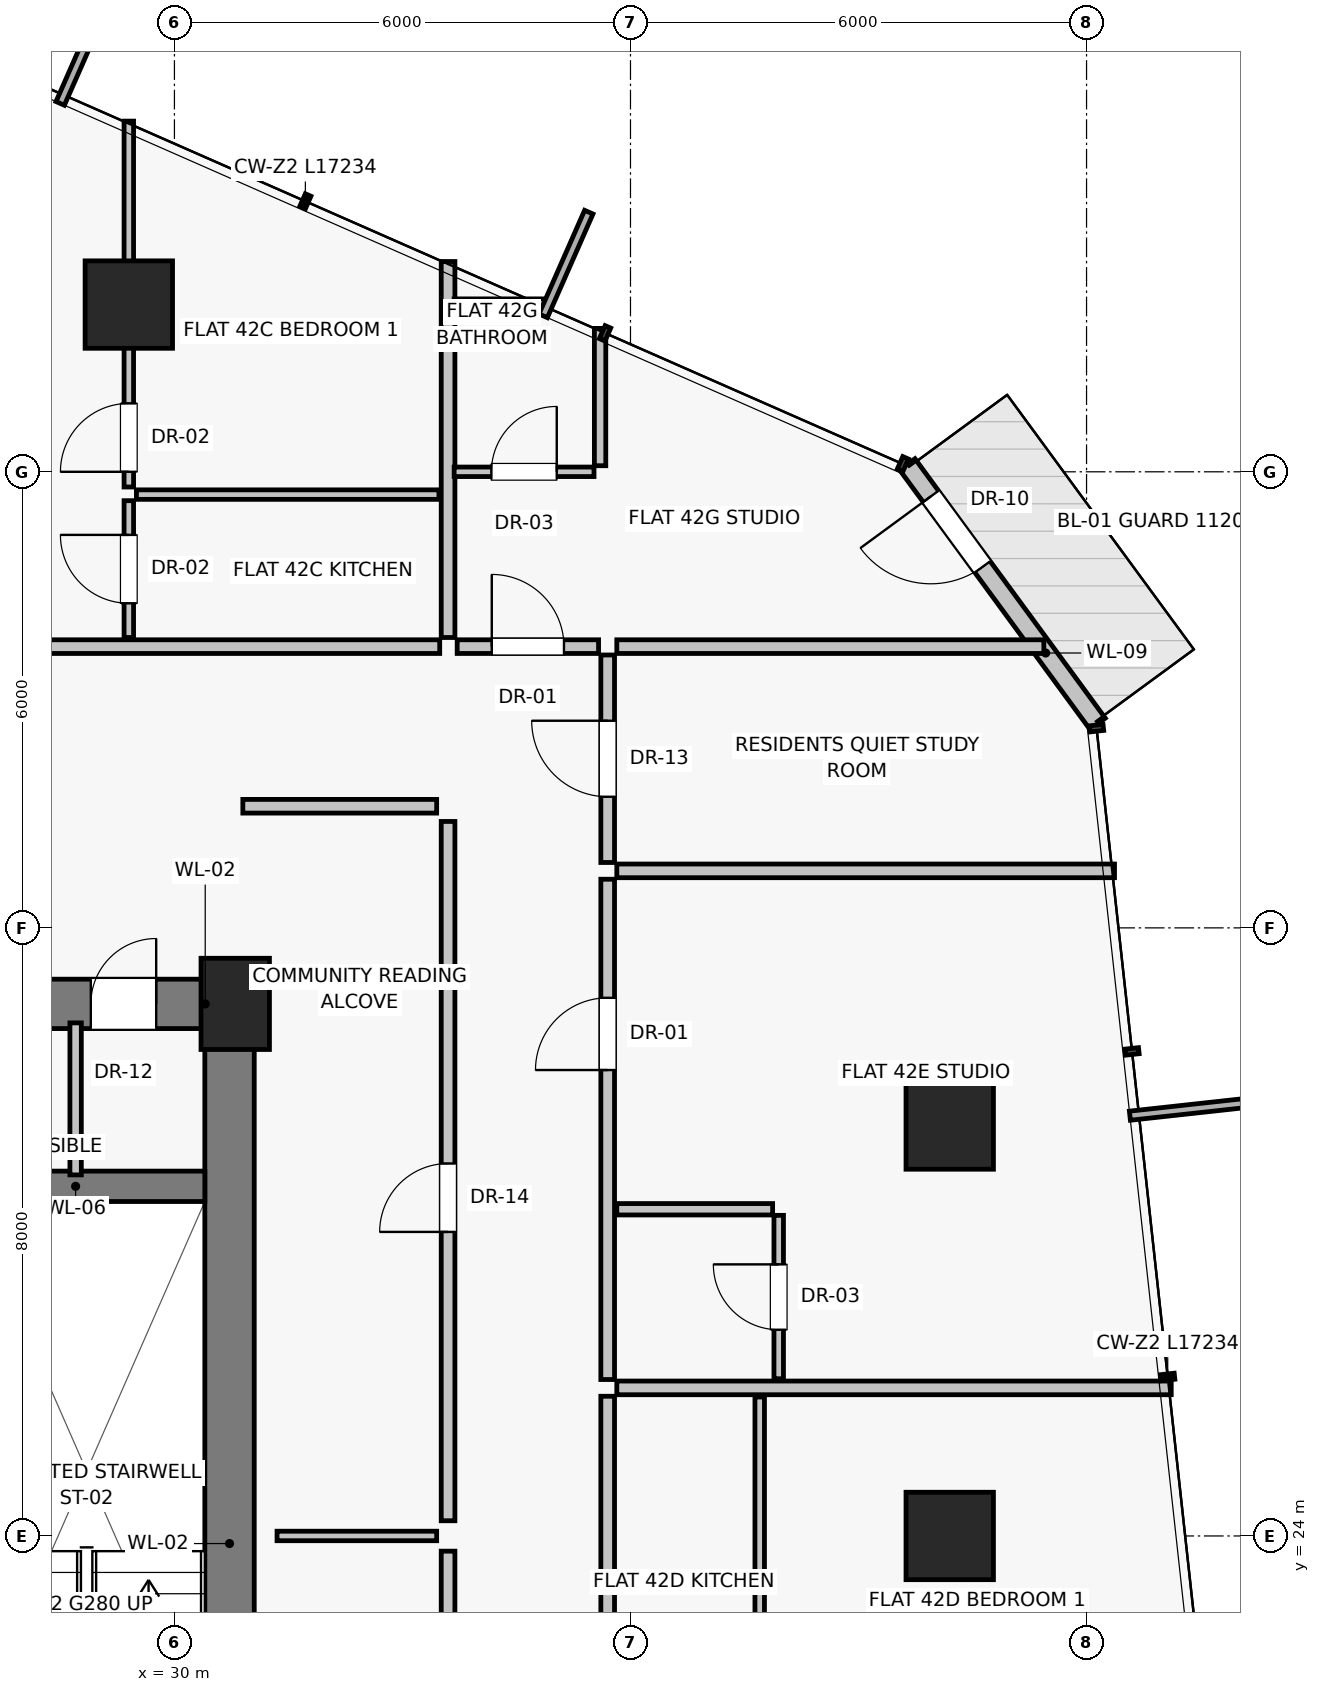
"""IFC4 building model, lengths in metres.
Left out: names, types, materials, properties, quantities, classifications, styles, units other than length and angle.
Written with IfcOpenShell. Run it as: python <this file> out.ifc"""

import sys

from ifc_helpers import new_model, si_unit, direction, frame, frame_2d, origin, origin_2d, place, context, subcontext, project, spatial, rectangle, extrude, source, transform, mapped, element, fill, save


model = new_model("IFC4")
c1 = context("Model", 3, precision=1e-05, world=origin(), true_north=direction((0.0, 1.0)))
c2 = subcontext(c1, "Body", "Model", "MODEL_VIEW")
j1 = project(units=[si_unit("LENGTHUNIT", "METRE"), si_unit("PLANEANGLEUNIT", "RADIAN")], contexts=[c1])
p1 = place(None, origin())
s1 = spatial("IfcSite", under=j1, at=p1, CompositionType="ELEMENT")
p2 = place(p1, origin())
s2 = spatial("IfcBuilding", under=s1, at=p2, CompositionType="ELEMENT")
p3 = place(p2, frame((0.0, 0.0, 149.0)))
s3 = spatial("IfcBuildingStorey", under=s2, at=p3, CompositionType="ELEMENT", Elevation=149.0)
p4 = place(p3, frame((30.8, 31.0, 0.0), z_axis=(0.0, 0.0, 1.0), x_axis=(1.0, 0.0, 0.0)))
e1 = element("IfcColumn", 1, at=p4, inside=s3, PredefinedType="PILASTER", context=c2, shape_type="SweptSolid", body=[
    extrude(rectangle(XDim=0.9, YDim=1.2, at=origin_2d()), origin(), (0.0, 0.0, 1.0), 3.25),
])
for number, where, z_axis, x_axis in (
    (2, (40.2, 24.0, 0.0), (0.0, 0.0, 1.0), (1.0, 0.0, 0.0)),
    (3, (40.2, 29.4, 0.0), (0.0, 0.0, 1.0), (1.0, 0.0, 0.0)),
    (4, (29.4, 40.2, 0.0), (0.0, 0.0, 1.0), (1.0, 0.0, 0.0)),
):
    element("IfcColumn", number, at=place(p3, frame(where, z_axis=z_axis, x_axis=x_axis)), inside=s3, PredefinedType="COLUMN", context=c2, shape_type="SweptSolid", body=[
        extrude(rectangle(XDim=1.15, YDim=1.15, at=origin_2d()), origin(), (0.0, 0.0, 1.0), 3.25),
    ])
p5 = place(p3, frame((42.146, 34.685, 0.0), z_axis=(0.0, 0.0, 1.0), x_axis=(-0.591421166937, 0.806362823609, 0.0)))
e5 = element("IfcWall", 5, at=p5, inside=s3, PredefinedType="SOLIDWALL", context=c2, shape_type="SweptSolid", body=[
    extrude(rectangle(XDim=4.233, YDim=0.25, at=frame_2d((2.117, 0.0))), origin(), (0.0, 0.0, 1.0), 3.0),
])
p6 = place(p5, frame((2.56, 0.0, 0.0)))
e6 = element("IfcOpeningElement", 6, at=p6, cuts=e5, PredefinedType="OPENING", context=c2, shape_type="SweptSolid", body=[
    extrude(rectangle(XDim=1.15, YDim=2.25, at=frame_2d((0.575, 1.125))), frame((0.0, 0.135, 0.0), z_axis=(0.0, -1.0, 0.0), x_axis=(1.0, 0.0, 0.0)), (0.0, 0.0, 1.0), 0.27),
])
p7 = place(p3, frame((30.725, 16.8, 0.0), z_axis=(0.0, 0.0, 1.0), x_axis=(0.0, 1.0, 0.0)))
e7 = element("IfcWall", 7, at=p7, inside=s3, PredefinedType="SHEAR", context=c2, shape_type="SweptSolid", body=[
    extrude(rectangle(XDim=14.2, YDim=0.65, at=frame_2d((7.1, 0.0))), origin(), (0.0, 0.0, 1.0), 3.0),
])
p8 = place(p3, frame((27.0, 31.0, 0.0), z_axis=(0.0, 0.0, 1.0), x_axis=(1.0, 0.0, 0.0)))
e8 = element("IfcWall", 8, at=p8, inside=s3, PredefinedType="SHEAR", context=c2, shape_type="SweptSolid", body=[
    extrude(rectangle(XDim=3.8, YDim=0.65, at=frame_2d((1.9, 0.0))), origin(), (0.0, 0.0, 1.0), 3.0),
])
p9 = place(p8, frame((0.45, 0.0, 0.0)))
e9 = element("IfcOpeningElement", 9, at=p9, cuts=e8, PredefinedType="OPENING", context=c2, shape_type="SweptSolid", body=[
    extrude(rectangle(XDim=0.86, YDim=2.01, at=frame_2d((0.43, 1.005))), frame((0.0, 0.335, 0.0), z_axis=(0.0, -1.0, 0.0), x_axis=(1.0, 0.0, 0.0)), (0.0, 0.0, 1.0), 0.67),
])
p10 = place(p8, frame((1.9, 0.0, 0.0)))
e10 = element("IfcOpeningElement", 10, at=p10, cuts=e8, PredefinedType="OPENING", context=c2, shape_type="SweptSolid", body=[
    extrude(rectangle(XDim=0.86, YDim=2.01, at=frame_2d((0.43, 1.005))), frame((0.0, 0.335, 0.0), z_axis=(0.0, -1.0, 0.0), x_axis=(1.0, 0.0, 0.0)), (0.0, 0.0, 1.0), 0.67),
])
p11 = place(p3, frame((27.0, 28.6, 0.0), z_axis=(0.0, 0.0, 1.0), x_axis=(1.0, 0.0, 0.0)))
e11 = element("IfcWall", 11, at=p11, inside=s3, PredefinedType="SHEAR", context=c2, shape_type="SweptSolid", body=[
    extrude(rectangle(XDim=3.4, YDim=0.4, at=frame_2d((1.7, 0.0))), origin(), (0.0, 0.0, 1.0), 3.0),
])
p12 = place(p3, frame((28.7, 28.75, 0.0), z_axis=(0.0, 0.0, 1.0), x_axis=(0.0, 1.0, 0.0)))
e12 = element("IfcWall", 12, at=p12, inside=s3, PredefinedType="PARTITIONING", context=c2, shape_type="SweptSolid", body=[
    extrude(rectangle(XDim=2.0, YDim=0.15, at=frame_2d((1.0, 0.0))), origin(), (0.0, 0.0, 1.0), 3.0),
])
p13 = place(p3, frame((33.6, 14.4, 0.0), z_axis=(0.0, 0.0, 1.0), x_axis=(0.0, 1.0, 0.0)))
e13 = element("IfcWall", 13, at=p13, inside=s3, PredefinedType="PARTITIONING", context=c2, shape_type="SweptSolid", body=[
    extrude(rectangle(XDim=9.4, YDim=0.18, at=frame_2d((4.7, 0.0))), origin(), (0.0, 0.0, 1.0), 3.0),
])
p14 = place(p13, frame((3.8, 0.0, 0.0)))
e14 = element("IfcOpeningElement", 14, at=p14, cuts=e13, PredefinedType="OPENING", context=c2, shape_type="SweptSolid", body=[
    extrude(rectangle(XDim=0.9, YDim=2.01, at=frame_2d((0.45, 1.005))), frame((0.0, 0.1, 0.0), z_axis=(0.0, -1.0, 0.0), x_axis=(1.0, 0.0, 0.0)), (0.0, 0.0, 1.0), 0.2),
])
p15 = place(p3, frame((33.6, 24.2, 0.0), z_axis=(0.0, 0.0, 1.0), x_axis=(0.0, 1.0, 0.0)))
e15 = element("IfcWall", 15, at=p15, inside=s3, PredefinedType="PARTITIONING", context=c2, shape_type="SweptSolid", body=[
    extrude(rectangle(XDim=9.2, YDim=0.18, at=frame_2d((4.6, 0.0))), origin(), (0.0, 0.0, 1.0), 3.0),
])
p16 = place(p15, frame((3.8, 0.0, 0.0)))
e16 = element("IfcOpeningElement", 16, at=p16, cuts=e15, PredefinedType="OPENING", context=c2, shape_type="SweptSolid", body=[
    extrude(rectangle(XDim=0.9, YDim=2.01, at=frame_2d((0.45, 1.005))), frame((0.0, 0.1, 0.0), z_axis=(0.0, -1.0, 0.0), x_axis=(1.0, 0.0, 0.0)), (0.0, 0.0, 1.0), 0.2),
])
p17 = place(p3, frame((31.35, 24.0, 0.0), z_axis=(0.0, 0.0, 1.0), x_axis=(1.0, 0.0, 0.0)))
e17 = element("IfcWall", 17, at=p17, inside=s3, PredefinedType="PARTITIONING", context=c2, shape_type="SweptSolid", body=[
    extrude(rectangle(XDim=2.1, YDim=0.125, at=frame_2d((1.05, 0.0))), origin(), (0.0, 0.0, 1.0), 3.0),
])
p18 = place(p3, frame((30.9, 33.6, 0.0), z_axis=(0.0, 0.0, 1.0), x_axis=(1.0, 0.0, 0.0)))
e18 = element("IfcWall", 18, at=p18, inside=s3, PredefinedType="PARTITIONING", context=c2, shape_type="SweptSolid", body=[
    extrude(rectangle(XDim=2.55, YDim=0.18, at=frame_2d((1.275, 0.0))), origin(), (0.0, 0.0, 1.0), 3.0),
])
p19 = place(p3, frame((33.6, 35.82, 0.0), z_axis=(0.0, 0.0, 1.0), x_axis=(0.0, 1.0, 0.0)))
e19 = element("IfcWall", 19, at=p19, inside=s3, PredefinedType="PARTITIONING", context=c2, shape_type="SweptSolid", body=[
    extrude(rectangle(XDim=4.946, YDim=0.18, at=frame_2d((2.473, 0.0))), origin(), (0.0, 0.0, 1.0), 3.0),
])
p20 = place(p3, frame((18.71, 35.7, 0.0), z_axis=(0.0, 0.0, 1.0), x_axis=(1.0, 0.0, 0.0)))
e20 = element("IfcWall", 20, at=p20, inside=s3, PredefinedType="PARTITIONING", context=c2, shape_type="SweptSolid", body=[
    extrude(rectangle(XDim=14.78, YDim=0.18, at=frame_2d((7.39, 0.0))), origin(), (0.0, 0.0, 1.0), 2.58),
])
p21 = place(p20, frame((5.94, 0.0, 0.0)))
e21 = element("IfcOpeningElement", 21, at=p21, cuts=e20, PredefinedType="OPENING", context=c2, shape_type="SweptSolid", body=[
    extrude(rectangle(XDim=0.95, YDim=2.02, at=frame_2d((0.475, 1.01))), frame((0.0, 0.1, 0.0), z_axis=(0.0, -1.0, 0.0), x_axis=(1.0, 0.0, 0.0)), (0.0, 0.0, 1.0), 0.2),
])
p22 = place(p3, frame((29.4, 35.82, 0.0), z_axis=(0.0, 0.0, 1.0), x_axis=(0.0, 1.0, 0.0)))
e22 = element("IfcWall", 22, at=p22, inside=s3, PredefinedType="PARTITIONING", context=c2, shape_type="SweptSolid", body=[
    extrude(rectangle(XDim=1.8, YDim=0.125, at=frame_2d((0.9, 0.0))), origin(), (0.0, 0.0, 1.0), 2.378),
])
p23 = place(p22, frame((0.45, 0.0, 0.0)))
e23 = element("IfcOpeningElement", 23, at=p23, cuts=e22, PredefinedType="OPENING", context=c2, shape_type="SweptSolid", body=[
    extrude(rectangle(XDim=0.9, YDim=2.01, at=frame_2d((0.45, 1.005))), frame((0.0, 0.073, 0.0), z_axis=(0.0, -1.0, 0.0), x_axis=(1.0, 0.0, 0.0)), (0.0, 0.0, 1.0), 0.145),
])
p24 = place(p3, frame((29.5, 37.7, 0.0), z_axis=(0.0, 0.0, 1.0), x_axis=(1.0, 0.0, 0.0)))
e24 = element("IfcWall", 24, at=p24, inside=s3, PredefinedType="PARTITIONING", context=c2, shape_type="SweptSolid", body=[
    extrude(rectangle(XDim=3.98, YDim=0.125, at=frame_2d((1.99, 0.0))), origin(), (0.0, 0.0, 1.0), 3.0),
])
p25 = place(p3, frame((29.4, 37.8, 0.0), z_axis=(0.0, 0.0, 1.0), x_axis=(0.0, 1.0, 0.0)))
e25 = element("IfcWall", 25, at=p25, inside=s3, PredefinedType="PARTITIONING", context=c2, shape_type="SweptSolid", body=[
    extrude(rectangle(XDim=4.813, YDim=0.125, at=frame_2d((2.407, 0.0))), origin(), (0.0, 0.0, 1.0), 2.378),
])
p26 = place(p25, frame((0.2, 0.0, 0.0)))
e26 = element("IfcOpeningElement", 26, at=p26, cuts=e25, PredefinedType="OPENING", context=c2, shape_type="SweptSolid", body=[
    extrude(rectangle(XDim=0.9, YDim=2.01, at=frame_2d((0.45, 1.005))), frame((0.0, 0.073, 0.0), z_axis=(0.0, -1.0, 0.0), x_axis=(1.0, 0.0, 0.0)), (0.0, 0.0, 1.0), 0.145),
])
p27 = place(p3, frame((35.82, 35.7, 0.0), z_axis=(0.0, 0.0, 1.0), x_axis=(1.0, 0.0, 0.0)))
e27 = element("IfcWall", 27, at=p27, inside=s3, PredefinedType="PARTITIONING", context=c2, shape_type="SweptSolid", body=[
    extrude(rectangle(XDim=5.618, YDim=0.18, at=frame_2d((2.809, 0.0))), origin(), (0.0, 0.0, 1.0), 3.0),
])
p28 = place(p3, frame((35.7, 12.21, 0.0), z_axis=(0.0, 0.0, 1.0), x_axis=(0.0, 1.0, 0.0)))
e28 = element("IfcWall", 28, at=p28, inside=s3, PredefinedType="PARTITIONING", context=c2, shape_type="SweptSolid", body=[
    extrude(rectangle(XDim=13.628, YDim=0.18, at=frame_2d((6.814, 0.0))), origin(), (0.0, 0.0, 1.0), 2.58),
])
p29 = place(p28, frame((4.348, 0.0, 0.0)))
e29 = element("IfcOpeningElement", 29, at=p29, cuts=e28, PredefinedType="OPENING", context=c2, shape_type="SweptSolid", body=[
    extrude(rectangle(XDim=0.95, YDim=2.02, at=frame_2d((0.475, 1.01))), frame((0.0, 0.1, 0.0), z_axis=(0.0, -1.0, 0.0), x_axis=(1.0, 0.0, 0.0)), (0.0, 0.0, 1.0), 0.2),
])
p30 = place(p3, frame((37.7, 19.816, 0.0), z_axis=(0.0, 0.0, 1.0), x_axis=(0.0, 1.0, 0.0)))
e30 = element("IfcWall", 30, at=p30, inside=s3, PredefinedType="PARTITIONING", context=c2, shape_type="SweptSolid", body=[
    extrude(rectangle(XDim=6.012, YDim=0.125, at=frame_2d((3.006, 0.0))), origin(), (0.0, 0.0, 1.0), 3.0),
])
p31 = place(p3, frame((35.82, 25.948, 0.0), z_axis=(0.0, 0.0, 1.0), x_axis=(1.0, 0.0, 0.0)))
e31 = element("IfcWall", 31, at=p31, inside=s3, PredefinedType="PARTITIONING", context=c2, shape_type="SweptSolid", body=[
    extrude(rectangle(XDim=7.294, YDim=0.18, at=frame_2d((3.647, 0.0))), origin(), (0.0, 0.0, 1.0), 3.0),
])
p32 = place(p3, frame((35.7, 32.86, 0.0), z_axis=(0.0, 0.0, 1.0), x_axis=(0.0, 1.0, 0.0)))
e32 = element("IfcWall", 32, at=p32, inside=s3, PredefinedType="PARTITIONING", context=c2, shape_type="SweptSolid", body=[
    extrude(rectangle(XDim=2.73, YDim=0.18, at=frame_2d((1.365, 0.0))), origin(), (0.0, 0.0, 1.0), 3.0),
])
p33 = place(p32, frame((0.865, 0.0, 0.0)))
e33 = element("IfcOpeningElement", 33, at=p33, cuts=e32, PredefinedType="OPENING", context=c2, shape_type="SweptSolid", body=[
    extrude(rectangle(XDim=1.0, YDim=2.01, at=frame_2d((0.5, 1.005))), frame((0.0, 0.1, 0.0), z_axis=(0.0, -1.0, 0.0), x_axis=(1.0, 0.0, 0.0)), (0.0, 0.0, 1.0), 0.2),
])
p34 = place(p3, frame((35.82, 32.75, 0.0), z_axis=(0.0, 0.0, 1.0), x_axis=(1.0, 0.0, 0.0)))
e34 = element("IfcWall", 34, at=p34, inside=s3, PredefinedType="PARTITIONING", context=c2, shape_type="SweptSolid", body=[
    extrude(rectangle(XDim=6.548, YDim=0.18, at=frame_2d((3.274, 0.0))), origin(), (0.0, 0.0, 1.0), 3.0),
])
p35 = place(p3, frame((35.7, 26.058, 0.0), z_axis=(0.0, 0.0, 1.0), x_axis=(0.0, 1.0, 0.0)))
e35 = element("IfcWall", 35, at=p35, inside=s3, PredefinedType="PARTITIONING", context=c2, shape_type="SweptSolid", body=[
    extrude(rectangle(XDim=6.582, YDim=0.18, at=frame_2d((3.291, 0.0))), origin(), (0.0, 0.0, 1.0), 2.58),
])
p36 = place(p35, frame((4.072, 0.0, 0.0)))
e36 = element("IfcOpeningElement", 36, at=p36, cuts=e35, PredefinedType="OPENING", context=c2, shape_type="SweptSolid", body=[
    extrude(rectangle(XDim=0.95, YDim=2.02, at=frame_2d((0.475, 1.01))), frame((0.0, 0.1, 0.0), z_axis=(0.0, -1.0, 0.0), x_axis=(1.0, 0.0, 0.0)), (0.0, 0.0, 1.0), 0.2),
])
p37 = place(p3, frame((35.82, 28.298, 0.0), z_axis=(0.0, 0.0, 1.0), x_axis=(1.0, 0.0, 0.0)))
e37 = element("IfcWall", 37, at=p37, inside=s3, PredefinedType="PARTITIONING", context=c2, shape_type="SweptSolid", body=[
    extrude(rectangle(XDim=2.05, YDim=0.15, at=frame_2d((1.025, 0.0))), origin(), (0.0, 0.0, 1.0), 3.0),
])
p38 = place(p3, frame((37.95, 26.068, 0.0), z_axis=(0.0, 0.0, 1.0), x_axis=(0.0, 1.0, 0.0)))
e38 = element("IfcWall", 38, at=p38, inside=s3, PredefinedType="PARTITIONING", context=c2, shape_type="SweptSolid", body=[
    extrude(rectangle(XDim=2.15, YDim=0.125, at=frame_2d((1.075, 0.0))), origin(), (0.0, 0.0, 1.0), 3.0),
])
p39 = place(p38, frame((0.645, 0.0, 0.0)))
e39 = element("IfcOpeningElement", 39, at=p39, cuts=e38, PredefinedType="OPENING", context=c2, shape_type="SweptSolid", body=[
    extrude(rectangle(XDim=0.86, YDim=2.01, at=frame_2d((0.43, 1.005))), frame((0.0, 0.073, 0.0), z_axis=(0.0, -1.0, 0.0), x_axis=(1.0, 0.0, 0.0)), (0.0, 0.0, 1.0), 0.145),
])
p40 = place(p3, frame((33.72, 35.7, 0.0), z_axis=(0.0, 0.0, 1.0), x_axis=(1.0, 0.0, 0.0)))
e40 = element("IfcWall", 40, at=p40, inside=s3, PredefinedType="PARTITIONING", context=c2, shape_type="SweptSolid", body=[
    extrude(rectangle(XDim=1.86, YDim=0.18, at=frame_2d((0.93, 0.0))), origin(), (0.0, 0.0, 1.0), 3.0),
])
p41 = place(p40, frame((0.455, 0.0, 0.0)))
e41 = element("IfcOpeningElement", 41, at=p41, cuts=e40, PredefinedType="OPENING", context=c2, shape_type="SweptSolid", body=[
    extrude(rectangle(XDim=0.95, YDim=2.02, at=frame_2d((0.475, 1.01))), frame((0.0, 0.1, 0.0), z_axis=(0.0, -1.0, 0.0), x_axis=(1.0, 0.0, 0.0)), (0.0, 0.0, 1.0), 0.2),
])
p42 = place(p3, frame((33.68, 38.0, 0.0), z_axis=(0.0, 0.0, 1.0), x_axis=(1.0, 0.0, 0.0)))
e42 = element("IfcWall", 42, at=p42, inside=s3, PredefinedType="PARTITIONING", context=c2, shape_type="SweptSolid", body=[
    extrude(rectangle(XDim=1.84, YDim=0.125, at=frame_2d((0.92, 0.0))), origin(), (0.0, 0.0, 1.0), 3.0),
])
p43 = place(p42, frame((0.49, 0.0, 0.0)))
e43 = element("IfcOpeningElement", 43, at=p43, cuts=e42, PredefinedType="OPENING", context=c2, shape_type="SweptSolid", body=[
    extrude(rectangle(XDim=0.86, YDim=2.01, at=frame_2d((0.43, 1.005))), frame((0.0, 0.073, 0.0), z_axis=(0.0, -1.0, 0.0), x_axis=(1.0, 0.0, 0.0)), (0.0, 0.0, 1.0), 0.145),
])
p44 = place(p3, frame((33.68, 40.2, 0.0), z_axis=(0.0, 0.0, 1.0), x_axis=(1.0, 0.0, 0.0)))
e44 = element("IfcWall", 44, at=p44, inside=s3, PredefinedType="PARTITIONING", context=c2, shape_type="SweptSolid", body=[
    extrude(rectangle(XDim=1.208, YDim=0.15, at=frame_2d((0.604, 0.0))), origin(), (0.0, 0.0, 1.0), 3.0),
])
p45 = place(p3, frame((35.6, 38.08, 0.0), z_axis=(0.0, 0.0, 1.0), x_axis=(0.0, 1.0, 0.0)))
e45 = element("IfcWall", 45, at=p45, inside=s3, PredefinedType="PARTITIONING", context=c2, shape_type="SweptSolid", body=[
    extrude(rectangle(XDim=1.807, YDim=0.15, at=frame_2d((0.903, 0.0))), origin(), (0.0, 0.0, 1.0), 3.0),
])
m1 = source(origin(), c2, "Body", "SweptSolid", [
    extrude(rectangle(XDim=1.15, YDim=2.25, at=frame_2d((0.575, 1.125))), frame((0.0, 0.025, 0.0), z_axis=(0.0, -1.0, 0.0), x_axis=(1.0, 0.0, 0.0)), (0.0, 0.0, 1.0), 0.05),
])
p46 = place(p6, frame((1.15, 0.0, 0.0), z_axis=(0.0, 0.0, 1.0), x_axis=(-1.0, 0.0, 0.0)))
e46 = element("IfcDoor", 46, at=p46, inside=s3, OperationType="SINGLE_SWING_RIGHT", PredefinedType="DOOR", context=c2, shape_type="MappedRepresentation", body=[
    mapped(m1, transform((0.0, 0.0, 0.0), scale=1.0)),
])
fill(e6, e46)
m2 = source(origin(), c2, "Body", "SweptSolid", [
    extrude(rectangle(XDim=0.86, YDim=2.01, at=frame_2d((0.43, 1.005))), frame((0.0, 0.025, 0.0), z_axis=(0.0, -1.0, 0.0), x_axis=(1.0, 0.0, 0.0)), (0.0, 0.0, 1.0), 0.05),
])
p47 = place(p10, origin())
e47 = element("IfcDoor", 47, at=p47, inside=s3, OperationType="SINGLE_SWING_RIGHT", PredefinedType="DOOR", context=c2, shape_type="MappedRepresentation", body=[
    mapped(m2, transform((0.0, 0.0, 0.0), scale=1.0)),
])
fill(e10, e47)
m3 = source(origin(), c2, "Body", "SweptSolid", [
    extrude(rectangle(XDim=0.9, YDim=2.01, at=frame_2d((0.45, 1.005))), frame((0.0, 0.025, 0.0), z_axis=(0.0, -1.0, 0.0), x_axis=(1.0, 0.0, 0.0)), (0.0, 0.0, 1.0), 0.05),
])
p48 = place(p16, origin())
e48 = element("IfcDoor", 48, at=p48, inside=s3, OperationType="SINGLE_SWING_LEFT", PredefinedType="DOOR", context=c2, shape_type="MappedRepresentation", body=[
    mapped(m3, transform((0.0, 0.0, 0.0), scale=1.0)),
])
fill(e16, e48)
p49 = place(p23, origin())
e49 = element("IfcDoor", 49, at=p49, inside=s3, OperationType="SINGLE_SWING_RIGHT", PredefinedType="DOOR", context=c2, shape_type="MappedRepresentation", body=[
    mapped(m3, transform((0.0, 0.0, 0.0), scale=1.0)),
])
fill(e23, e49)
p50 = place(p26, origin())
e50 = element("IfcDoor", 50, at=p50, inside=s3, OperationType="SINGLE_SWING_LEFT", PredefinedType="DOOR", context=c2, shape_type="MappedRepresentation", body=[
    mapped(m3, transform((0.0, 0.0, 0.0), scale=1.0)),
])
fill(e26, e50)
m4 = source(origin(), c2, "Body", "SweptSolid", [
    extrude(rectangle(XDim=1.0, YDim=2.01, at=frame_2d((0.5, 1.005))), frame((0.0, 0.025, 0.0), z_axis=(0.0, -1.0, 0.0), x_axis=(1.0, 0.0, 0.0)), (0.0, 0.0, 1.0), 0.05),
])
p51 = place(p33, origin())
e51 = element("IfcDoor", 51, at=p51, inside=s3, OperationType="SINGLE_SWING_RIGHT", PredefinedType="DOOR", context=c2, shape_type="MappedRepresentation", body=[
    mapped(m4, transform((0.0, 0.0, 0.0), scale=1.0)),
])
fill(e33, e51)
m5 = source(origin(), c2, "Body", "SweptSolid", [
    extrude(rectangle(XDim=0.95, YDim=2.02, at=frame_2d((0.475, 1.01))), frame((0.0, 0.025, 0.0), z_axis=(0.0, -1.0, 0.0), x_axis=(1.0, 0.0, 0.0)), (0.0, 0.0, 1.0), 0.05),
])
p52 = place(p36, origin())
e52 = element("IfcDoor", 52, at=p52, inside=s3, OperationType="SINGLE_SWING_LEFT", PredefinedType="DOOR", context=c2, shape_type="MappedRepresentation", body=[
    mapped(m5, transform((0.0, 0.0, 0.0), scale=1.0)),
])
fill(e36, e52)
p53 = place(p39, origin())
e53 = element("IfcDoor", 53, at=p53, inside=s3, OperationType="SINGLE_SWING_RIGHT", PredefinedType="DOOR", context=c2, shape_type="MappedRepresentation", body=[
    mapped(m2, transform((0.0, 0.0, 0.0), scale=1.0)),
])
fill(e39, e53)
p54 = place(p41, origin())
e54 = element("IfcDoor", 54, at=p54, inside=s3, OperationType="SINGLE_SWING_LEFT", PredefinedType="DOOR", context=c2, shape_type="MappedRepresentation", body=[
    mapped(m5, transform((0.0, 0.0, 0.0), scale=1.0)),
])
fill(e41, e54)
p55 = place(p43, origin())
e55 = element("IfcDoor", 55, at=p55, inside=s3, OperationType="SINGLE_SWING_RIGHT", PredefinedType="DOOR", context=c2, shape_type="MappedRepresentation", body=[
    mapped(m2, transform((0.0, 0.0, 0.0), scale=1.0)),
])
fill(e43, e55)
save(model, sys.argv[1])
